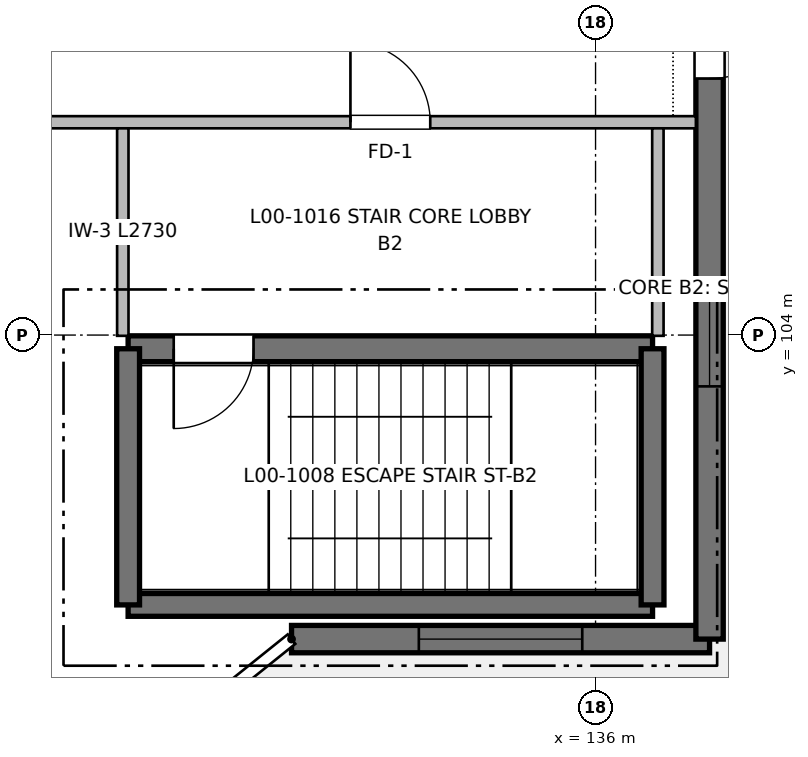
"""IFC4 building model, lengths in metres.
Left out: names, types, materials, properties, quantities, classifications, styles, units other than length and angle.
Written with IfcOpenShell. Run it as: python <this file> out.ifc"""

import sys

from ifc_helpers import new_model, si_unit, direction, frame, frame_2d, origin, place, context, subcontext, project, spatial, rectangle, extrude, element, fill, save


model = new_model("IFC4")
c1 = context("Model", 3, precision=1e-05, world=origin(), true_north=direction((0.0, 1.0)))
c2 = subcontext(c1, "Body", "Model", "MODEL_VIEW")
j1 = project(units=[si_unit("LENGTHUNIT", "METRE"), si_unit("PLANEANGLEUNIT", "RADIAN")], contexts=[c1])
p1 = place(None, origin())
s1 = spatial("IfcSite", under=j1, at=p1, CompositionType="ELEMENT")
p2 = place(p1, origin())
s2 = spatial("IfcBuilding", under=s1, at=p2, CompositionType="ELEMENT")
p3 = place(p2, origin())
s3 = spatial("IfcBuildingStorey", under=s2, at=p3, CompositionType="ELEMENT", Elevation=0.0)
p4 = place(p3, frame((129.85, 100.45, 0.0), z_axis=(0.0, 0.0, 1.0), x_axis=(1.0, 0.0, 0.0)))
e1 = element("IfcWall", 1, at=p4, inside=s3, PredefinedType="SHEAR", context=c2, shape_type="SweptSolid", body=[
    extrude(rectangle(XDim=6.9, YDim=0.3, at=frame_2d((3.45, 0.0))), origin(), (0.0, 0.0, 1.0), 4.16),
])
p5 = place(p3, frame((136.75, 103.82, 0.0), z_axis=(0.0, 0.0, 1.0), x_axis=(-1.0, 0.0, 0.0)))
e2 = element("IfcWall", 2, at=p5, inside=s3, PredefinedType="SHEAR", context=c2, shape_type="SweptSolid", body=[
    extrude(rectangle(XDim=6.9, YDim=0.34, at=frame_2d((3.45, 0.0))), origin(), (0.0, 0.0, 1.0), 4.16),
])
p6 = place(p5, frame((5.25, 0.0, 0.0)))
e3 = element("IfcOpeningElement", 3, at=p6, cuts=e2, PredefinedType="OPENING", context=c2, shape_type="SweptSolid", body=[
    extrude(rectangle(XDim=1.05, YDim=2.15, at=frame_2d((0.525, 1.075))), frame((0.0, 0.18, 0.0), z_axis=(0.0, -1.0, 0.0), x_axis=(1.0, 0.0, 0.0)), (0.0, 0.0, 1.0), 0.36),
])
for number, where, z_axis, x_axis in (
    (4, (129.85, 103.82, 0.0), (0.0, 0.0, 1.0), (0.0, -1.0, 0.0)),
    (5, (136.75, 100.45, 0.0), (0.0, 0.0, 1.0), (0.0, 1.0, 0.0)),
):
    element("IfcWall", number, at=place(p3, frame(where, z_axis=z_axis, x_axis=x_axis)), inside=s3, PredefinedType="SHEAR", context=c2, shape_type="SweptSolid", body=[
        extrude(rectangle(XDim=3.37, YDim=0.3, at=frame_2d((1.685, 0.0))), origin(), (0.0, 0.0, 1.0), 4.16),
    ])
p7 = place(p3, frame((137.5, 100.0, 0.0), z_axis=(0.0, 0.0, 1.0), x_axis=(-1.0, 0.0, 0.0)))
e6 = element("IfcWall", 6, at=p7, inside=s3, PredefinedType="SHEAR", context=c2, shape_type="SweptSolid", body=[
    extrude(rectangle(XDim=5.5, YDim=0.36, at=frame_2d((2.75, 0.0))), origin(), (0.0, 0.0, 1.0), 3.94),
])
p8 = place(p7, frame((1.675, 0.0, 0.95)))
e7 = element("IfcOpeningElement", 7, at=p8, cuts=e6, PredefinedType="OPENING", context=c2, shape_type="SweptSolid", body=[
    extrude(rectangle(XDim=2.15, YDim=1.8, at=frame_2d((1.075, 0.9))), frame((0.0, 0.19, 0.0), z_axis=(0.0, -1.0, 0.0), x_axis=(1.0, 0.0, 0.0)), (0.0, 0.0, 1.0), 0.38),
])
p9 = place(p3, frame((137.5, 116.0, 0.0), z_axis=(0.0, 0.0, 1.0), x_axis=(0.0, -1.0, 0.0)))
e8 = element("IfcWall", 8, at=p9, inside=s3, PredefinedType="SHEAR", context=c2, shape_type="SweptSolid", body=[
    extrude(rectangle(XDim=16.0, YDim=0.36, at=frame_2d((8.0, 0.0))), origin(), (0.0, 0.0, 1.0), 3.94),
])
p10 = place(p9, frame((7.375, 0.0, 0.0)))
e9 = element("IfcOpeningElement", 9, at=p10, cuts=e8, PredefinedType="OPENING", context=c2, shape_type="SweptSolid", body=[
    extrude(rectangle(XDim=1.25, YDim=2.2, at=frame_2d((0.625, 1.1))), frame((0.0, 0.19, 0.0), z_axis=(0.0, -1.0, 0.0), x_axis=(1.0, 0.0, 0.0)), (0.0, 0.0, 1.0), 0.38),
])
p11 = place(p9, frame((11.325, 0.0, 0.95)))
e10 = element("IfcOpeningElement", 10, at=p11, cuts=e8, PredefinedType="OPENING", context=c2, shape_type="SweptSolid", body=[
    extrude(rectangle(XDim=1.35, YDim=1.3, at=frame_2d((0.675, 0.65))), frame((0.0, 0.19, 0.0), z_axis=(0.0, -1.0, 0.0), x_axis=(1.0, 0.0, 0.0)), (0.0, 0.0, 1.0), 0.38),
])
p12 = place(p3, frame((113.2, 106.8, 0.0), z_axis=(0.0, 0.0, 1.0), x_axis=(1.0, 0.0, 0.0)))
e11 = element("IfcWall", 11, at=p12, inside=s3, PredefinedType="PARTITIONING", context=c2, shape_type="SweptSolid", body=[
    extrude(rectangle(XDim=24.12, YDim=0.16, at=frame_2d((12.06, 0.0))), origin(), (0.0, 0.0, 1.0), 3.895),
])
p13 = place(p12, frame((19.575, 0.0, 0.0)))
e12 = element("IfcOpeningElement", 12, at=p13, cuts=e11, PredefinedType="OPENING", context=c2, shape_type="SweptSolid", body=[
    extrude(rectangle(XDim=1.05, YDim=2.15, at=frame_2d((0.525, 1.075))), frame((0.0, 0.09, 0.0), z_axis=(0.0, -1.0, 0.0), x_axis=(1.0, 0.0, 0.0)), (0.0, 0.0, 1.0), 0.18),
])
p14 = place(p12, frame((11.215, 0.0, 0.0)))
e13 = element("IfcOpeningElement", 13, at=p14, cuts=e11, PredefinedType="OPENING", context=c2, shape_type="SweptSolid", body=[
    extrude(rectangle(XDim=0.96, YDim=2.15, at=frame_2d((0.48, 1.075))), frame((0.0, 0.09, 0.0), z_axis=(0.0, -1.0, 0.0), x_axis=(1.0, 0.0, 0.0)), (0.0, 0.0, 1.0), 0.18),
])
for number, where, z_axis, x_axis in (
    (14, (129.78, 103.99, 0.0), (0.0, 0.0, 1.0), (0.0, 1.0, 0.0)),
    (15, (136.82, 103.99, 0.0), (0.0, 0.0, 1.0), (0.0, 1.0, 0.0)),
):
    element("IfcWall", number, at=place(p3, frame(where, z_axis=z_axis, x_axis=x_axis)), inside=s3, PredefinedType="PARTITIONING", context=c2, shape_type="SweptSolid", body=[
        extrude(rectangle(XDim=2.73, YDim=0.15, at=frame_2d((1.365, 0.0))), origin(), (0.0, 0.0, 1.0), 3.895),
    ])
p15 = place(p6, origin())
e16 = element("IfcDoor", 16, at=p15, inside=s3, OperationType="SINGLE_SWING_RIGHT", PredefinedType="DOOR", context=c2, shape_type="SweptSolid", body=[
    extrude(rectangle(XDim=1.05, YDim=2.15, at=frame_2d((0.525, 1.075))), frame((0.0, 0.025, 0.0), z_axis=(0.0, -1.0, 0.0), x_axis=(1.0, 0.0, 0.0)), (0.0, 0.0, 1.0), 0.05),
])
fill(e3, e16)
p16 = place(p8, origin())
e17 = element("IfcWindow", 17, at=p16, inside=s3, PartitioningType="SINGLE_PANEL", PredefinedType="WINDOW", context=c2, shape_type="SweptSolid", body=[
    extrude(rectangle(XDim=2.15, YDim=1.8, at=frame_2d((1.075, 0.9))), frame((0.0, 0.03, 0.0), z_axis=(0.0, -1.0, 0.0), x_axis=(1.0, 0.0, 0.0)), (0.0, 0.0, 1.0), 0.06),
])
fill(e7, e17)
p17 = place(p10, origin())
e18 = element("IfcDoor", 18, at=p17, inside=s3, OperationType="SINGLE_SWING_LEFT", PredefinedType="DOOR", context=c2, shape_type="SweptSolid", body=[
    extrude(rectangle(XDim=1.25, YDim=2.2, at=frame_2d((0.625, 1.1))), frame((0.0, 0.025, 0.0), z_axis=(0.0, -1.0, 0.0), x_axis=(1.0, 0.0, 0.0)), (0.0, 0.0, 1.0), 0.05),
])
fill(e9, e18)
p18 = place(p11, origin())
e19 = element("IfcWindow", 19, at=p18, inside=s3, PartitioningType="SINGLE_PANEL", PredefinedType="WINDOW", context=c2, shape_type="SweptSolid", body=[
    extrude(rectangle(XDim=1.35, YDim=1.3, at=frame_2d((0.675, 0.65))), frame((0.0, 0.03, 0.0), z_axis=(0.0, -1.0, 0.0), x_axis=(1.0, 0.0, 0.0)), (0.0, 0.0, 1.0), 0.06),
])
fill(e10, e19)
p19 = place(p13, origin())
e20 = element("IfcDoor", 20, at=p19, inside=s3, OperationType="SINGLE_SWING_LEFT", PredefinedType="DOOR", context=c2, shape_type="SweptSolid", body=[
    extrude(rectangle(XDim=1.05, YDim=2.15, at=frame_2d((0.525, 1.075))), frame((0.0, 0.025, 0.0), z_axis=(0.0, -1.0, 0.0), x_axis=(1.0, 0.0, 0.0)), (0.0, 0.0, 1.0), 0.05),
])
fill(e12, e20)
save(model, sys.argv[1])
